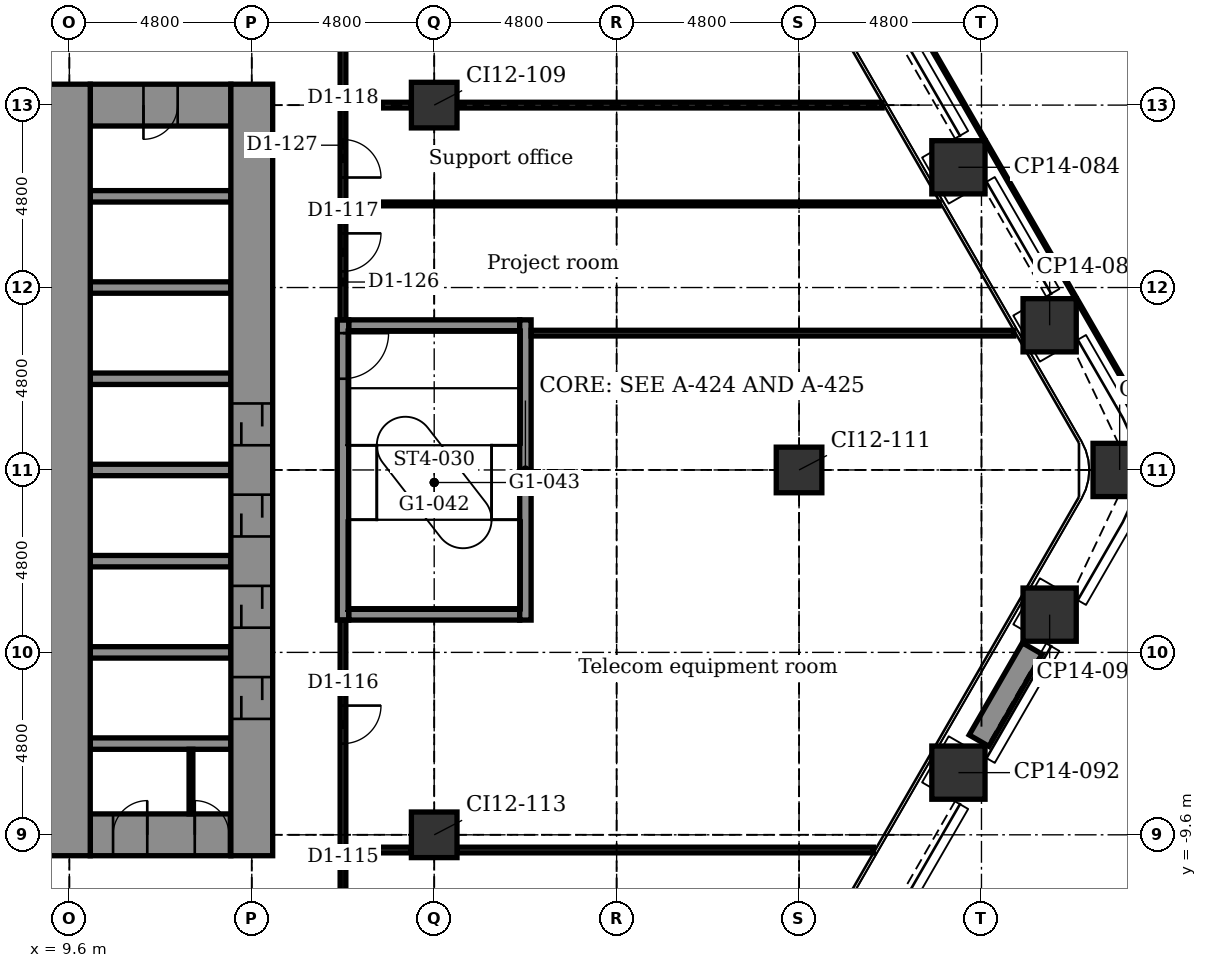
"""IFC4 building model, lengths in metres.
Left out: names, types, materials, properties, quantities, classifications, styles, units other than length and angle.
Written with IfcOpenShell. Run it as: python <this file> out.ifc"""

import sys

from ifc_helpers import new_model, si_unit, direction, frame, frame_2d, origin, origin_2d, place, context, subcontext, project, spatial, rectangle, extrude, element, fill, save


model = new_model("IFC4")
c1 = context("Model", 3, precision=1e-05, world=origin(), true_north=direction((0.0, 1.0)))
c2 = subcontext(c1, "Body", "Model", "MODEL_VIEW")
j1 = project(units=[si_unit("LENGTHUNIT", "METRE"), si_unit("PLANEANGLEUNIT", "RADIAN")], contexts=[c1])
p1 = place(None, origin())
s1 = spatial("IfcSite", under=j1, at=p1, CompositionType="ELEMENT")
p2 = place(p1, origin())
s2 = spatial("IfcBuilding", under=s1, at=p2, CompositionType="ELEMENT")
p3 = place(p2, frame((0.0, 0.0, 44.4)))
s3 = spatial("IfcBuildingStorey", under=s2, at=p3, CompositionType="ELEMENT", Elevation=44.4)
for number, where, z_axis, x_axis in (
    (1, (32.994, 7.964, -0.25), (0.0, 0.0, 1.0), (0.866, 0.5, 0.0)),
    (2, (35.394, 3.807, -0.25), (0.0, 0.0, 1.0), (0.866, 0.5, 0.0)),
    (3, (37.236, 0.0, -0.25), (0.0, 0.0, 1.0), (1.0, 0.0, 0.0)),
    (4, (35.394, -3.807, -0.25), (0.0, 0.0, 1.0), (0.5, 0.866, 0.0)),
    (5, (32.994, -7.964, -0.25), (0.0, 0.0, 1.0), (0.5, 0.866, 0.0)),
):
    element("IfcColumn", number, at=place(p3, frame(where, z_axis=z_axis, x_axis=x_axis)), inside=s3, PredefinedType="COLUMN", context=c2, shape_type="SweptSolid", body=[
        extrude(rectangle(XDim=1.4, YDim=1.4, at=origin_2d()), origin(), (0.0, 0.0, 1.0), 5.5),
    ])
for number, where, z_axis, x_axis in (
    (6, (19.2, -9.6, -0.25), (0.0, 0.0, 1.0), (1.0, 0.0, 0.0)),
    (7, (19.2, 9.6, -0.25), (0.0, 0.0, 1.0), (1.0, 0.0, 0.0)),
    (8, (28.8, 0.0, -0.25), (0.0, 0.0, 1.0), (1.0, 0.0, 0.0)),
):
    element("IfcColumn", number, at=place(p3, frame(where, z_axis=z_axis, x_axis=x_axis)), inside=s3, PredefinedType="COLUMN", context=c2, shape_type="SweptSolid", body=[
        extrude(rectangle(XDim=1.2, YDim=1.2, at=origin_2d()), origin(), (0.0, 0.0, 1.0), 5.5),
    ])
p4 = place(p3, frame((10.15, -9.6, -0.25), z_axis=(0.0, 0.0, 1.0), x_axis=(1.0, 0.0, 0.0)))
e9 = element("IfcWall", 9, at=p4, inside=s3, PredefinedType="SHEAR", context=c2, shape_type="SweptSolid", body=[
    extrude(rectangle(XDim=3.7, YDim=1.1, at=frame_2d((1.85, 0.0))), origin(), (0.0, 0.0, 1.0), 5.5),
])
p5 = place(p4, frame((0.6, 0.0, 0.25)))
e10 = element("IfcOpeningElement", 10, at=p5, cuts=e9, PredefinedType="OPENING", context=c2, shape_type="SweptSolid", body=[
    extrude(rectangle(XDim=0.9, YDim=2.1, at=frame_2d((0.45, 1.05))), frame((0.0, 0.56, 0.0), z_axis=(0.0, -1.0, 0.0), x_axis=(1.0, 0.0, 0.0)), (0.0, 0.0, 1.0), 1.12),
])
p6 = place(p4, frame((2.75, 0.0, 0.25)))
e11 = element("IfcOpeningElement", 11, at=p6, cuts=e9, PredefinedType="OPENING", context=c2, shape_type="SweptSolid", body=[
    extrude(rectangle(XDim=0.9, YDim=2.1, at=frame_2d((0.45, 1.05))), frame((0.0, 0.56, 0.0), z_axis=(0.0, -1.0, 0.0), x_axis=(1.0, 0.0, 0.0)), (0.0, 0.0, 1.0), 1.12),
])
for number, where, z_axis, x_axis in (
    (12, (10.15, -7.2, -0.25), (0.0, 0.0, 1.0), (1.0, 0.0, 0.0)),
    (13, (10.15, -4.8, -0.25), (0.0, 0.0, 1.0), (1.0, 0.0, 0.0)),
):
    element("IfcWall", number, at=place(p3, frame(where, z_axis=z_axis, x_axis=x_axis)), inside=s3, PredefinedType="STANDARD", context=c2, shape_type="SweptSolid", body=[
        extrude(rectangle(XDim=3.7, YDim=0.3, at=frame_2d((1.85, 0.0))), origin(), (0.0, 0.0, 1.0), 5.5),
    ])
p7 = place(p3, frame((16.95, -3.8, -0.25), z_axis=(0.0, 0.0, 1.0), x_axis=(1.0, 0.0, 0.0)))
e14 = element("IfcWall", 14, at=p7, inside=s3, PredefinedType="STANDARD", context=c2, shape_type="SweptSolid", body=[
    extrude(rectangle(XDim=4.5, YDim=0.3, at=frame_2d((2.25, 0.0))), origin(), (0.0, 0.0, 1.0), 5.5),
])
for number, where, z_axis, x_axis in (
    (15, (10.15, -2.4, -0.25), (0.0, 0.0, 1.0), (1.0, 0.0, 0.0)),
    (16, (10.15, 0.0, -0.25), (0.0, 0.0, 1.0), (1.0, 0.0, 0.0)),
    (17, (10.15, 2.4, -0.25), (0.0, 0.0, 1.0), (1.0, 0.0, 0.0)),
):
    element("IfcWall", number, at=place(p3, frame(where, z_axis=z_axis, x_axis=x_axis)), inside=s3, PredefinedType="STANDARD", context=c2, shape_type="SweptSolid", body=[
        extrude(rectangle(XDim=3.7, YDim=0.3, at=frame_2d((1.85, 0.0))), origin(), (0.0, 0.0, 1.0), 5.5),
    ])
p8 = place(p3, frame((16.95, 3.8, -0.25), z_axis=(0.0, 0.0, 1.0), x_axis=(1.0, 0.0, 0.0)))
e18 = element("IfcWall", 18, at=p8, inside=s3, PredefinedType="STANDARD", context=c2, shape_type="SweptSolid", body=[
    extrude(rectangle(XDim=4.5, YDim=0.3, at=frame_2d((2.25, 0.0))), origin(), (0.0, 0.0, 1.0), 5.5),
])
for number, where, z_axis, x_axis in (
    (19, (10.15, 4.8, -0.25), (0.0, 0.0, 1.0), (1.0, 0.0, 0.0)),
    (20, (10.15, 7.2, -0.25), (0.0, 0.0, 1.0), (1.0, 0.0, 0.0)),
):
    element("IfcWall", number, at=place(p3, frame(where, z_axis=z_axis, x_axis=x_axis)), inside=s3, PredefinedType="STANDARD", context=c2, shape_type="SweptSolid", body=[
        extrude(rectangle(XDim=3.7, YDim=0.3, at=frame_2d((1.85, 0.0))), origin(), (0.0, 0.0, 1.0), 5.5),
    ])
p9 = place(p3, frame((10.15, 9.6, -0.25), z_axis=(0.0, 0.0, 1.0), x_axis=(1.0, 0.0, 0.0)))
e21 = element("IfcWall", 21, at=p9, inside=s3, PredefinedType="SHEAR", context=c2, shape_type="SweptSolid", body=[
    extrude(rectangle(XDim=3.7, YDim=1.1, at=frame_2d((1.85, 0.0))), origin(), (0.0, 0.0, 1.0), 5.5),
])
p10 = place(p9, frame((1.4, 0.0, 0.25)))
e22 = element("IfcOpeningElement", 22, at=p10, cuts=e21, PredefinedType="OPENING", context=c2, shape_type="SweptSolid", body=[
    extrude(rectangle(XDim=0.9, YDim=2.1, at=frame_2d((0.45, 1.05))), frame((0.0, 0.56, 0.0), z_axis=(0.0, -1.0, 0.0), x_axis=(1.0, 0.0, 0.0)), (0.0, 0.0, 1.0), 1.12),
])
p11 = place(p3, frame((9.6, -10.15, -0.25), z_axis=(0.0, 0.0, 1.0), x_axis=(0.0, 1.0, 0.0)))
e23 = element("IfcWall", 23, at=p11, inside=s3, PredefinedType="SHEAR", context=c2, shape_type="SweptSolid", body=[
    extrude(rectangle(XDim=20.3, YDim=1.1, at=frame_2d((10.15, 0.0))), origin(), (0.0, 0.0, 1.0), 5.5),
])
p12 = place(p3, frame((14.4, -10.15, -0.25), z_axis=(0.0, 0.0, 1.0), x_axis=(0.0, 1.0, 0.0)))
e24 = element("IfcWall", 24, at=p12, inside=s3, PredefinedType="SHEAR", context=c2, shape_type="SweptSolid", body=[
    extrude(rectangle(XDim=20.3, YDim=1.1, at=frame_2d((10.15, 0.0))), origin(), (0.0, 0.0, 1.0), 5.5),
])
p13 = place(p12, frame((3.6, 0.0, 0.25)))
e25 = element("IfcOpeningElement", 25, at=p13, cuts=e24, PredefinedType="OPENING", context=c2, shape_type="SweptSolid", body=[
    extrude(rectangle(XDim=1.1, YDim=2.1, at=frame_2d((0.55, 1.05))), frame((0.0, 0.56, 0.0), z_axis=(0.0, -1.0, 0.0), x_axis=(1.0, 0.0, 0.0)), (0.0, 0.0, 1.0), 1.12),
])
p14 = place(p12, frame((6.0, 0.0, 0.25)))
e26 = element("IfcOpeningElement", 26, at=p14, cuts=e24, PredefinedType="OPENING", context=c2, shape_type="SweptSolid", body=[
    extrude(rectangle(XDim=1.1, YDim=2.1, at=frame_2d((0.55, 1.05))), frame((0.0, 0.56, 0.0), z_axis=(0.0, -1.0, 0.0), x_axis=(1.0, 0.0, 0.0)), (0.0, 0.0, 1.0), 1.12),
])
p15 = place(p12, frame((8.4, 0.0, 0.25)))
e27 = element("IfcOpeningElement", 27, at=p15, cuts=e24, PredefinedType="OPENING", context=c2, shape_type="SweptSolid", body=[
    extrude(rectangle(XDim=1.1, YDim=2.1, at=frame_2d((0.55, 1.05))), frame((0.0, 0.56, 0.0), z_axis=(0.0, -1.0, 0.0), x_axis=(1.0, 0.0, 0.0)), (0.0, 0.0, 1.0), 1.12),
])
p16 = place(p12, frame((10.8, 0.0, 0.25)))
e28 = element("IfcOpeningElement", 28, at=p16, cuts=e24, PredefinedType="OPENING", context=c2, shape_type="SweptSolid", body=[
    extrude(rectangle(XDim=1.1, YDim=2.1, at=frame_2d((0.55, 1.05))), frame((0.0, 0.56, 0.0), z_axis=(0.0, -1.0, 0.0), x_axis=(1.0, 0.0, 0.0)), (0.0, 0.0, 1.0), 1.12),
])
p17 = place(p3, frame((16.8, -3.95, -0.25), z_axis=(0.0, 0.0, 1.0), x_axis=(0.0, 1.0, 0.0)))
e29 = element("IfcWall", 29, at=p17, inside=s3, PredefinedType="STANDARD", context=c2, shape_type="SweptSolid", body=[
    extrude(rectangle(XDim=7.9, YDim=0.3, at=frame_2d((3.95, 0.0))), origin(), (0.0, 0.0, 1.0), 5.5),
])
p18 = place(p17, frame((6.35, 0.0, 0.25)))
e30 = element("IfcOpeningElement", 30, at=p18, cuts=e29, PredefinedType="OPENING", context=c2, shape_type="SweptSolid", body=[
    extrude(rectangle(XDim=1.2, YDim=2.1, at=frame_2d((0.6, 1.05))), frame((0.0, 0.16, 0.0), z_axis=(0.0, -1.0, 0.0), x_axis=(1.0, 0.0, 0.0)), (0.0, 0.0, 1.0), 0.32),
])
p19 = place(p3, frame((21.6, -3.95, -0.25), z_axis=(0.0, 0.0, 1.0), x_axis=(0.0, 1.0, 0.0)))
e31 = element("IfcWall", 31, at=p19, inside=s3, PredefinedType="STANDARD", context=c2, shape_type="SweptSolid", body=[
    extrude(rectangle(XDim=7.9, YDim=0.3, at=frame_2d((3.95, 0.0))), origin(), (0.0, 0.0, 1.0), 5.5),
])
p20 = place(p3, frame((34.937, -4.698, 0.0), z_axis=(0.0, 0.0, 1.0), x_axis=(-0.49998411664, -0.866034573852, 0.0)))
e32 = element("IfcWall", 32, at=p20, inside=s3, PredefinedType="USERDEFINED", context=c2, shape_type="SweptSolid", body=[
    extrude(rectangle(XDim=2.8, YDim=0.6, at=frame_2d((1.4, 0.0))), origin(), (0.0, 0.0, 1.0), 0.7),
])
p21 = place(p3, frame((16.8, -13.0, 0.0), z_axis=(0.0, 0.0, 1.0), x_axis=(0.0, 1.0, 0.0)))
e33 = element("IfcWall", 33, at=p21, inside=s3, PredefinedType="PARTITIONING", context=c2, shape_type="SweptSolid", body=[
    extrude(rectangle(XDim=9.05, YDim=0.15, at=frame_2d((4.525, 0.0))), origin(), (0.0, 0.0, 1.0), 5.25),
])
p22 = place(p21, frame((0.725, 0.0, 0.0)))
e34 = element("IfcOpeningElement", 34, at=p22, cuts=e33, PredefinedType="OPENING", context=c2, shape_type="SweptSolid", body=[
    extrude(rectangle(XDim=1.0, YDim=2.1, at=frame_2d((0.5, 1.05))), frame((0.0, 0.085, 0.0), z_axis=(0.0, -1.0, 0.0), x_axis=(1.0, 0.0, 0.0)), (0.0, 0.0, 1.0), 0.17),
])
p23 = place(p21, frame((5.8, 0.0, 0.0)))
e35 = element("IfcOpeningElement", 35, at=p23, cuts=e33, PredefinedType="OPENING", context=c2, shape_type="SweptSolid", body=[
    extrude(rectangle(XDim=1.0, YDim=2.1, at=frame_2d((0.5, 1.05))), frame((0.0, 0.085, 0.0), z_axis=(0.0, -1.0, 0.0), x_axis=(1.0, 0.0, 0.0)), (0.0, 0.0, 1.0), 0.17),
])
p24 = place(p3, frame((16.8, 3.95, 0.0), z_axis=(0.0, 0.0, 1.0), x_axis=(0.0, 1.0, 0.0)))
e36 = element("IfcWall", 36, at=p24, inside=s3, PredefinedType="PARTITIONING", context=c2, shape_type="SweptSolid", body=[
    extrude(rectangle(XDim=9.35, YDim=0.15, at=frame_2d((4.675, 0.0))), origin(), (0.0, 0.0, 1.0), 5.25),
])
p25 = place(p24, frame((1.275, 0.0, 0.0)))
e37 = element("IfcOpeningElement", 37, at=p25, cuts=e36, PredefinedType="OPENING", context=c2, shape_type="SweptSolid", body=[
    extrude(rectangle(XDim=1.0, YDim=2.1, at=frame_2d((0.5, 1.05))), frame((0.0, 0.085, 0.0), z_axis=(0.0, -1.0, 0.0), x_axis=(1.0, 0.0, 0.0)), (0.0, 0.0, 1.0), 0.17),
])
p26 = place(p24, frame((3.745, 0.0, 0.0)))
e38 = element("IfcOpeningElement", 38, at=p26, cuts=e36, PredefinedType="OPENING", context=c2, shape_type="SweptSolid", body=[
    extrude(rectangle(XDim=1.0, YDim=2.1, at=frame_2d((0.5, 1.05))), frame((0.0, 0.085, 0.0), z_axis=(0.0, -1.0, 0.0), x_axis=(1.0, 0.0, 0.0)), (0.0, 0.0, 1.0), 0.17),
])
p27 = place(p24, frame((7.2, 0.0, 0.0)))
e39 = element("IfcOpeningElement", 39, at=p27, cuts=e36, PredefinedType="OPENING", context=c2, shape_type="SweptSolid", body=[
    extrude(rectangle(XDim=1.0, YDim=2.1, at=frame_2d((0.5, 1.05))), frame((0.0, 0.085, 0.0), z_axis=(0.0, -1.0, 0.0), x_axis=(1.0, 0.0, 0.0)), (0.0, 0.0, 1.0), 0.17),
])
p28 = place(p3, frame((12.8, -9.05, 0.0), z_axis=(0.0, 0.0, 1.0), x_axis=(0.0, 1.0, 0.0)))
e40 = element("IfcWall", 40, at=p28, inside=s3, PredefinedType="PARTITIONING", context=c2, shape_type="SweptSolid", body=[
    extrude(rectangle(XDim=1.7, YDim=0.1, at=frame_2d((0.85, 0.0))), origin(), (0.0, 0.0, 1.0), 5.25),
])
p29 = place(p3, frame((16.8, -10.0, 0.0), z_axis=(0.0, 0.0, 1.0), x_axis=(1.0, 0.0, 0.0)))
e41 = element("IfcWall", 41, at=p29, inside=s3, PredefinedType="PARTITIONING", context=c2, shape_type="SweptSolid", body=[
    extrude(rectangle(XDim=1.8, YDim=0.15, at=frame_2d((0.9, 0.0))), origin(), (0.0, 0.0, 1.0), 5.25),
])
p30 = place(p3, frame((19.8, -10.0, 0.0), z_axis=(0.0, 0.0, 1.0), x_axis=(1.0, 0.0, 0.0)))
e42 = element("IfcWall", 42, at=p30, inside=s3, PredefinedType="PARTITIONING", context=c2, shape_type="SweptSolid", body=[
    extrude(rectangle(XDim=10.956, YDim=0.15, at=frame_2d((5.478, 0.0))), origin(), (0.0, 0.0, 1.0), 5.25),
])
p31 = place(p3, frame((21.75, 3.6, 0.0), z_axis=(0.0, 0.0, 1.0), x_axis=(1.0, 0.0, 0.0)))
e43 = element("IfcWall", 43, at=p31, inside=s3, PredefinedType="PARTITIONING", context=c2, shape_type="SweptSolid", body=[
    extrude(rectangle(XDim=12.701, YDim=0.15, at=frame_2d((6.351, 0.0))), origin(), (0.0, 0.0, 1.0), 5.25),
])
p32 = place(p3, frame((16.8, 7.0, 0.0), z_axis=(0.0, 0.0, 1.0), x_axis=(1.0, 0.0, 0.0)))
e44 = element("IfcWall", 44, at=p32, inside=s3, PredefinedType="PARTITIONING", context=c2, shape_type="SweptSolid", body=[
    extrude(rectangle(XDim=15.688, YDim=0.1, at=frame_2d((7.844, 0.0))), origin(), (0.0, 0.0, 1.0), 5.25),
])
p33 = place(p3, frame((16.8, 9.6, 0.0), z_axis=(0.0, 0.0, 1.0), x_axis=(1.0, 0.0, 0.0)))
e45 = element("IfcWall", 45, at=p33, inside=s3, PredefinedType="PARTITIONING", context=c2, shape_type="SweptSolid", body=[
    extrude(rectangle(XDim=1.8, YDim=0.15, at=frame_2d((0.9, 0.0))), origin(), (0.0, 0.0, 1.0), 4.642),
])
p34 = place(p3, frame((19.8, 9.6, 0.0), z_axis=(0.0, 0.0, 1.0), x_axis=(1.0, 0.0, 0.0)))
e46 = element("IfcWall", 46, at=p34, inside=s3, PredefinedType="PARTITIONING", context=c2, shape_type="SweptSolid", body=[
    extrude(rectangle(XDim=11.187, YDim=0.15, at=frame_2d((5.593, 0.0))), origin(), (0.0, 0.0, 1.0), 4.488),
])
p35 = place(p23, frame((1.0, 0.0, 0.0), z_axis=(0.0, 0.0, 1.0), x_axis=(-1.0, 0.0, 0.0)))
e47 = element("IfcDoor", 47, at=p35, inside=s3, OperationType="SINGLE_SWING_RIGHT", PredefinedType="DOOR", context=c2, shape_type="SweptSolid", body=[
    extrude(rectangle(XDim=1.0, YDim=2.1, at=frame_2d((0.5, 1.05))), frame((0.0, 0.025, 0.0), z_axis=(0.0, -1.0, 0.0), x_axis=(1.0, 0.0, 0.0)), (0.0, 0.0, 1.0), 0.05),
])
fill(e35, e47)
p36 = place(p25, frame((1.0, 0.0, 0.0), z_axis=(0.0, 0.0, 1.0), x_axis=(-1.0, 0.0, 0.0)))
e48 = element("IfcDoor", 48, at=p36, inside=s3, OperationType="SINGLE_SWING_RIGHT", PredefinedType="DOOR", context=c2, shape_type="SweptSolid", body=[
    extrude(rectangle(XDim=1.0, YDim=2.1, at=frame_2d((0.5, 1.05))), frame((0.0, 0.025, 0.0), z_axis=(0.0, -1.0, 0.0), x_axis=(1.0, 0.0, 0.0)), (0.0, 0.0, 1.0), 0.05),
])
fill(e37, e48)
p37 = place(p26, frame((1.0, 0.0, 0.0), z_axis=(0.0, 0.0, 1.0), x_axis=(-1.0, 0.0, 0.0)))
e49 = element("IfcDoor", 49, at=p37, inside=s3, OperationType="SINGLE_SWING_LEFT", PredefinedType="DOOR", context=c2, shape_type="SweptSolid", body=[
    extrude(rectangle(XDim=1.0, YDim=2.1, at=frame_2d((0.5, 1.05))), frame((0.0, 0.025, 0.0), z_axis=(0.0, -1.0, 0.0), x_axis=(1.0, 0.0, 0.0)), (0.0, 0.0, 1.0), 0.05),
])
fill(e38, e49)
p38 = place(p13, origin())
e50 = element("IfcDoor", 50, at=p38, inside=s3, OperationType="DOUBLE_DOOR_SLIDING", PredefinedType="DOOR", context=c2, shape_type="SweptSolid", body=[
    extrude(rectangle(XDim=1.1, YDim=2.1, at=frame_2d((0.55, 1.05))), frame((0.0, 0.025, 0.0), z_axis=(0.0, -1.0, 0.0), x_axis=(1.0, 0.0, 0.0)), (0.0, 0.0, 1.0), 0.05),
])
fill(e25, e50)
p39 = place(p14, origin())
e51 = element("IfcDoor", 51, at=p39, inside=s3, OperationType="DOUBLE_DOOR_SLIDING", PredefinedType="DOOR", context=c2, shape_type="SweptSolid", body=[
    extrude(rectangle(XDim=1.1, YDim=2.1, at=frame_2d((0.55, 1.05))), frame((0.0, 0.025, 0.0), z_axis=(0.0, -1.0, 0.0), x_axis=(1.0, 0.0, 0.0)), (0.0, 0.0, 1.0), 0.05),
])
fill(e26, e51)
p40 = place(p15, origin())
e52 = element("IfcDoor", 52, at=p40, inside=s3, OperationType="DOUBLE_DOOR_SLIDING", PredefinedType="DOOR", context=c2, shape_type="SweptSolid", body=[
    extrude(rectangle(XDim=1.1, YDim=2.1, at=frame_2d((0.55, 1.05))), frame((0.0, 0.025, 0.0), z_axis=(0.0, -1.0, 0.0), x_axis=(1.0, 0.0, 0.0)), (0.0, 0.0, 1.0), 0.05),
])
fill(e27, e52)
p41 = place(p16, origin())
e53 = element("IfcDoor", 53, at=p41, inside=s3, OperationType="DOUBLE_DOOR_SLIDING", PredefinedType="DOOR", context=c2, shape_type="SweptSolid", body=[
    extrude(rectangle(XDim=1.1, YDim=2.1, at=frame_2d((0.55, 1.05))), frame((0.0, 0.025, 0.0), z_axis=(0.0, -1.0, 0.0), x_axis=(1.0, 0.0, 0.0)), (0.0, 0.0, 1.0), 0.05),
])
fill(e28, e53)
p42 = place(p18, frame((1.2, 0.0, 0.0), z_axis=(0.0, 0.0, 1.0), x_axis=(-1.0, 0.0, 0.0)))
e54 = element("IfcDoor", 54, at=p42, inside=s3, OperationType="SINGLE_SWING_RIGHT", PredefinedType="DOOR", context=c2, shape_type="SweptSolid", body=[
    extrude(rectangle(XDim=1.2, YDim=2.1, at=frame_2d((0.6, 1.05))), frame((0.0, 0.025, 0.0), z_axis=(0.0, -1.0, 0.0), x_axis=(1.0, 0.0, 0.0)), (0.0, 0.0, 1.0), 0.05),
])
fill(e30, e54)
p43 = place(p5, origin())
e55 = element("IfcDoor", 55, at=p43, inside=s3, OperationType="SINGLE_SWING_RIGHT", PredefinedType="DOOR", context=c2, shape_type="SweptSolid", body=[
    extrude(rectangle(XDim=0.9, YDim=2.1, at=frame_2d((0.45, 1.05))), frame((0.0, 0.025, 0.0), z_axis=(0.0, -1.0, 0.0), x_axis=(1.0, 0.0, 0.0)), (0.0, 0.0, 1.0), 0.05),
])
fill(e10, e55)
p44 = place(p6, origin())
e56 = element("IfcDoor", 56, at=p44, inside=s3, OperationType="SINGLE_SWING_LEFT", PredefinedType="DOOR", context=c2, shape_type="SweptSolid", body=[
    extrude(rectangle(XDim=0.9, YDim=2.1, at=frame_2d((0.45, 1.05))), frame((0.0, 0.025, 0.0), z_axis=(0.0, -1.0, 0.0), x_axis=(1.0, 0.0, 0.0)), (0.0, 0.0, 1.0), 0.05),
])
fill(e11, e56)
p45 = place(p10, frame((0.9, 0.0, 0.0), z_axis=(0.0, 0.0, 1.0), x_axis=(-1.0, 0.0, 0.0)))
e57 = element("IfcDoor", 57, at=p45, inside=s3, OperationType="SINGLE_SWING_LEFT", PredefinedType="DOOR", context=c2, shape_type="SweptSolid", body=[
    extrude(rectangle(XDim=0.9, YDim=2.1, at=frame_2d((0.45, 1.05))), frame((0.0, 0.025, 0.0), z_axis=(0.0, -1.0, 0.0), x_axis=(1.0, 0.0, 0.0)), (0.0, 0.0, 1.0), 0.05),
])
fill(e22, e57)
save(model, sys.argv[1])
